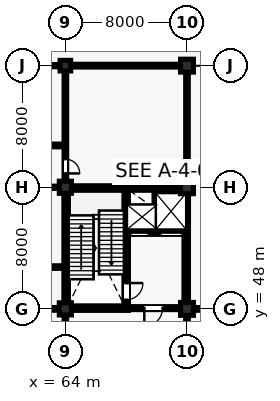
"""IFC4 building model, lengths in metres.
Left out: names, types, materials, properties, quantities, classifications, styles, units other than length and angle.
Written with IfcOpenShell. Run it as: python <this file> out.ifc"""

import sys

from ifc_helpers import new_model, si_unit, direction, frame, frame_2d, origin, origin_2d, place, context, subcontext, project, spatial, rectangle, extrude, element, fill, save


model = new_model("IFC4")
c1 = context("Model", 3, precision=1e-05, world=origin(), true_north=direction((0.0, 1.0)))
c2 = subcontext(c1, "Body", "Model", "MODEL_VIEW")
j1 = project(units=[si_unit("LENGTHUNIT", "METRE"), si_unit("PLANEANGLEUNIT", "RADIAN")], contexts=[c1])
p1 = place(None, origin())
s1 = spatial("IfcSite", under=j1, at=p1, CompositionType="ELEMENT")
p2 = place(p1, origin())
s2 = spatial("IfcBuilding", under=s1, at=p2, CompositionType="ELEMENT")
p3 = place(p2, origin())
s3 = spatial("IfcBuildingStorey", under=s2, at=p3, CompositionType="ELEMENT", Elevation=0.0)
for number, where, z_axis, x_axis in (
    (1, (64.0, 48.0, 0.0), (0.0, 0.0, 1.0), (1.0, 0.0, 0.0)),
    (2, (64.0, 56.0, 0.0), (0.0, 0.0, 1.0), (1.0, 0.0, 0.0)),
):
    element("IfcColumn", number, at=place(p3, frame(where, z_axis=z_axis, x_axis=x_axis)), inside=s3, PredefinedType="COLUMN", context=c2, shape_type="SweptSolid", body=[
        extrude(rectangle(XDim=0.8, YDim=0.8, at=origin_2d()), origin(), (0.0, 0.0, 1.0), 5.28),
    ])
p4 = place(p3, frame((64.0, 64.0, 0.0), z_axis=(0.0, 0.0, 1.0), x_axis=(1.0, 0.0, 0.0)))
e3 = element("IfcColumn", 3, at=p4, inside=s3, PredefinedType="COLUMN", context=c2, shape_type="SweptSolid", body=[
    extrude(rectangle(XDim=0.7, YDim=0.7, at=origin_2d()), origin(), (0.0, 0.0, 1.0), 5.28),
])
for number, where, z_axis, x_axis in (
    (4, (72.0, 48.0, 0.0), (0.0, 0.0, 1.0), (1.0, 0.0, 0.0)),
    (5, (72.0, 56.0, 0.0), (0.0, 0.0, 1.0), (1.0, 0.0, 0.0)),
    (6, (72.0, 64.0, 0.0), (0.0, 0.0, 1.0), (1.0, 0.0, 0.0)),
):
    element("IfcColumn", number, at=place(p3, frame(where, z_axis=z_axis, x_axis=x_axis)), inside=s3, PredefinedType="COLUMN", context=c2, shape_type="SweptSolid", body=[
        extrude(rectangle(XDim=0.85, YDim=0.85, at=origin_2d()), origin(), (0.0, 0.0, 1.0), 5.28),
    ])
p5 = place(p3, frame((64.05, 48.29, 0.0), z_axis=(0.0, 0.0, 1.0), x_axis=(0.0, 1.0, 0.0)))
e7 = element("IfcWall", 7, at=p5, inside=s3, PredefinedType="SHEAR", context=c2, shape_type="SweptSolid", body=[
    extrude(rectangle(XDim=7.42, YDim=0.3, at=frame_2d((3.71, 0.0))), origin(), (0.0, 0.0, 1.0), 5.035),
])
p6 = place(p3, frame((64.29, 55.95, 0.0), z_axis=(0.0, 0.0, 1.0), x_axis=(1.0, 0.0, 0.0)))
e8 = element("IfcWall", 8, at=p6, inside=s3, PredefinedType="SHEAR", context=c2, shape_type="SweptSolid", body=[
    extrude(rectangle(XDim=7.395, YDim=0.3, at=frame_2d((3.698, 0.0))), origin(), (0.0, 0.0, 1.0), 5.035),
])
p7 = place(p3, frame((71.95, 48.315, 0.0), z_axis=(0.0, 0.0, 1.0), x_axis=(0.0, 1.0, 0.0)))
e9 = element("IfcWall", 9, at=p7, inside=s3, PredefinedType="SHEAR", context=c2, shape_type="SweptSolid", body=[
    extrude(rectangle(XDim=7.37, YDim=0.3, at=frame_2d((3.685, 0.0))), origin(), (0.0, 0.0, 1.0), 5.035),
])
p8 = place(p3, frame((64.29, 48.05, 0.0), z_axis=(0.0, 0.0, 1.0), x_axis=(1.0, 0.0, 0.0)))
e10 = element("IfcWall", 10, at=p8, inside=s3, PredefinedType="SHEAR", context=c2, shape_type="SweptSolid", body=[
    extrude(rectangle(XDim=3.86, YDim=0.3, at=frame_2d((1.93, 0.0))), origin(), (0.0, 0.0, 1.0), 5.035),
])
p9 = place(p3, frame((68.0, 48.05, 0.0), z_axis=(0.0, 0.0, 1.0), x_axis=(0.0, 1.0, 0.0)))
e11 = element("IfcWall", 11, at=p9, inside=s3, PredefinedType="SHEAR", context=c2, shape_type="SweptSolid", body=[
    extrude(rectangle(XDim=7.9, YDim=0.3, at=frame_2d((3.95, 0.0))), origin(), (0.0, 0.0, 1.0), 5.035),
])
p10 = place(p9, frame((0.55, 0.0, 0.0)))
e12 = element("IfcOpeningElement", 12, at=p10, cuts=e11, PredefinedType="OPENING", context=c2, shape_type="SweptSolid", body=[
    extrude(rectangle(XDim=1.1, YDim=2.15, at=frame_2d((0.55, 1.075))), frame((0.0, 0.16, 0.0), z_axis=(0.0, -1.0, 0.0), x_axis=(1.0, 0.0, 0.0)), (0.0, 0.0, 1.0), 0.32),
])
p11 = place(p3, frame((68.0, 53.05, 0.0), z_axis=(0.0, 0.0, 1.0), x_axis=(1.0, 0.0, 0.0)))
e13 = element("IfcWall", 13, at=p11, inside=s3, PredefinedType="SHEAR", context=c2, shape_type="SweptSolid", body=[
    extrude(rectangle(XDim=3.95, YDim=0.3, at=frame_2d((1.975, 0.0))), origin(), (0.0, 0.0, 1.0), 5.035),
])
p12 = place(p11, frame((0.32, 0.0, 0.0)))
e14 = element("IfcOpeningElement", 14, at=p12, cuts=e13, PredefinedType="OPENING", context=c2, shape_type="SweptSolid", body=[
    extrude(rectangle(XDim=1.1, YDim=2.2, at=frame_2d((0.55, 1.1))), frame((0.0, 0.16, 0.0), z_axis=(0.0, -1.0, 0.0), x_axis=(1.0, 0.0, 0.0)), (0.0, 0.0, 1.0), 0.32),
])
p13 = place(p11, frame((2.28, 0.0, 0.0)))
e15 = element("IfcOpeningElement", 15, at=p13, cuts=e13, PredefinedType="OPENING", context=c2, shape_type="SweptSolid", body=[
    extrude(rectangle(XDim=1.35, YDim=2.3, at=frame_2d((0.675, 1.15))), frame((0.0, 0.16, 0.0), z_axis=(0.0, -1.0, 0.0), x_axis=(1.0, 0.0, 0.0)), (0.0, 0.0, 1.0), 0.32),
])
p14 = place(p3, frame((69.98, 53.05, 0.0), z_axis=(0.0, 0.0, 1.0), x_axis=(0.0, 1.0, 0.0)))
e16 = element("IfcWall", 16, at=p14, inside=s3, PredefinedType="SHEAR", context=c2, shape_type="SweptSolid", body=[
    extrude(rectangle(XDim=2.9, YDim=0.3, at=frame_2d((1.45, 0.0))), origin(), (0.0, 0.0, 1.0), 5.035),
])
p15 = place(p3, frame((68.0, 48.05, 0.0), z_axis=(0.0, 0.0, 1.0), x_axis=(1.0, 0.0, 0.0)))
e17 = element("IfcWall", 17, at=p15, inside=s3, PredefinedType="PARTITIONING", context=c2, shape_type="SweptSolid", body=[
    extrude(rectangle(XDim=3.585, YDim=0.2, at=frame_2d((1.792, 0.0))), origin(), (0.0, 0.0, 1.0), 4.336),
])
p16 = place(p15, frame((1.192, 0.0, 0.0)))
e18 = element("IfcOpeningElement", 18, at=p16, cuts=e17, PredefinedType="OPENING", context=c2, shape_type="SweptSolid", body=[
    extrude(rectangle(XDim=1.2, YDim=2.15, at=frame_2d((0.6, 1.075))), frame((0.0, 0.11, 0.0), z_axis=(0.0, -1.0, 0.0), x_axis=(1.0, 0.0, 0.0)), (0.0, 0.0, 1.0), 0.22),
])
p17 = place(p3, frame((58.7, 50.75, 0.0), z_axis=(0.0, 0.0, 1.0), x_axis=(1.0, 0.0, 0.0)))
e19 = element("IfcWall", 19, at=p17, inside=s3, PredefinedType="PARTITIONING", context=c2, shape_type="SweptSolid", body=[
    extrude(rectangle(XDim=5.28, YDim=0.175, at=frame_2d((2.64, 0.0))), origin(), (0.0, 0.0, 1.0), 4.404),
])
p18 = place(p17, frame((2.015, 0.0, 0.0)))
e20 = element("IfcOpeningElement", 20, at=p18, cuts=e19, PredefinedType="OPENING", context=c2, shape_type="SweptSolid", body=[
    extrude(rectangle(XDim=1.25, YDim=2.18, at=frame_2d((0.625, 1.09))), frame((0.0, 0.097, 0.0), z_axis=(0.0, -1.0, 0.0), x_axis=(1.0, 0.0, 0.0)), (0.0, 0.0, 1.0), 0.195),
])
p19 = place(p3, frame((58.75, 56.0, 0.0), z_axis=(0.0, 0.0, 1.0), x_axis=(1.0, 0.0, 0.0)))
e21 = element("IfcWall", 21, at=p19, inside=s3, PredefinedType="PARTITIONING", context=c2, shape_type="SweptSolid", body=[
    extrude(rectangle(XDim=4.84, YDim=0.15, at=frame_2d((2.42, 0.0))), origin(), (0.0, 0.0, 1.0), 4.336),
])
p20 = place(p3, frame((58.7, 58.75, 0.0), z_axis=(0.0, 0.0, 1.0), x_axis=(1.0, 0.0, 0.0)))
e22 = element("IfcWall", 22, at=p20, inside=s3, PredefinedType="PARTITIONING", context=c2, shape_type="SweptSolid", body=[
    extrude(rectangle(XDim=5.28, YDim=0.185, at=frame_2d((2.64, 0.0))), origin(), (0.0, 0.0, 1.0), 4.471),
])
p21 = place(p20, frame((2.17, 0.0, 0.0)))
e23 = element("IfcOpeningElement", 23, at=p21, cuts=e22, PredefinedType="OPENING", context=c2, shape_type="SweptSolid", body=[
    extrude(rectangle(XDim=0.94, YDim=2.12, at=frame_2d((0.47, 1.06))), frame((0.0, 0.103, 0.0), z_axis=(0.0, -1.0, 0.0), x_axis=(1.0, 0.0, 0.0)), (0.0, 0.0, 1.0), 0.205),
])
p22 = place(p3, frame((58.75, 64.0, 0.0), z_axis=(0.0, 0.0, 1.0), x_axis=(1.0, 0.0, 0.0)))
e24 = element("IfcWall", 24, at=p22, inside=s3, PredefinedType="PARTITIONING", context=c2, shape_type="SweptSolid", body=[
    extrude(rectangle(XDim=4.89, YDim=0.15, at=frame_2d((2.445, 0.0))), origin(), (0.0, 0.0, 1.0), 4.404),
])
p23 = place(p3, frame((64.0, 40.34, 0.0), z_axis=(0.0, 0.0, 1.0), x_axis=(0.0, 1.0, 0.0)))
e25 = element("IfcWall", 25, at=p23, inside=s3, PredefinedType="PARTITIONING", context=c2, shape_type="SweptSolid", body=[
    extrude(rectangle(XDim=7.27, YDim=0.175, at=frame_2d((3.635, 0.0))), origin(), (0.0, 0.0, 1.0), 4.412),
])
p24 = place(p23, frame((2.685, 0.0, 0.0)))
e26 = element("IfcOpeningElement", 26, at=p24, cuts=e25, PredefinedType="OPENING", context=c2, shape_type="SweptSolid", body=[
    extrude(rectangle(XDim=1.9, YDim=2.38, at=frame_2d((0.95, 1.19))), frame((0.0, 0.097, 0.0), z_axis=(0.0, -1.0, 0.0), x_axis=(1.0, 0.0, 0.0)), (0.0, 0.0, 1.0), 0.195),
])
p25 = place(p3, frame((56.34, 48.0, 0.0), z_axis=(0.0, 0.0, 1.0), x_axis=(1.0, 0.0, 0.0)))
e27 = element("IfcWall", 27, at=p25, inside=s3, PredefinedType="PARTITIONING", context=c2, shape_type="SweptSolid", body=[
    extrude(rectangle(XDim=7.27, YDim=0.185, at=frame_2d((3.635, 0.0))), origin(), (0.0, 0.0, 1.0), 4.403),
])
p26 = place(p25, frame((2.985, 0.0, 0.0)))
e28 = element("IfcOpeningElement", 28, at=p26, cuts=e27, PredefinedType="OPENING", context=c2, shape_type="SweptSolid", body=[
    extrude(rectangle(XDim=1.3, YDim=2.2, at=frame_2d((0.65, 1.1))), frame((0.0, 0.103, 0.0), z_axis=(0.0, -1.0, 0.0), x_axis=(1.0, 0.0, 0.0)), (0.0, 0.0, 1.0), 0.205),
])
p27 = place(p3, frame((64.0, 56.39, 0.0), z_axis=(0.0, 0.0, 1.0), x_axis=(0.0, 1.0, 0.0)))
e29 = element("IfcWall", 29, at=p27, inside=s3, PredefinedType="PARTITIONING", context=c2, shape_type="SweptSolid", body=[
    extrude(rectangle(XDim=7.27, YDim=0.175, at=frame_2d((3.635, 0.0))), origin(), (0.0, 0.0, 1.0), 4.471),
])
p28 = place(p27, frame((0.52, 0.0, 0.0)))
e30 = element("IfcOpeningElement", 30, at=p28, cuts=e29, PredefinedType="OPENING", context=c2, shape_type="SweptSolid", body=[
    extrude(rectangle(XDim=0.94, YDim=2.12, at=frame_2d((0.47, 1.06))), frame((0.0, 0.097, 0.0), z_axis=(0.0, -1.0, 0.0), x_axis=(1.0, 0.0, 0.0)), (0.0, 0.0, 1.0), 0.195),
])
p29 = place(p3, frame((72.0, 40.415, 0.0), z_axis=(0.0, 0.0, 1.0), x_axis=(0.0, 1.0, 0.0)))
e31 = element("IfcWall", 31, at=p29, inside=s3, PredefinedType="PARTITIONING", context=c2, shape_type="SweptSolid", body=[
    extrude(rectangle(XDim=7.17, YDim=0.185, at=frame_2d((3.585, 0.0))), origin(), (0.0, 0.0, 1.0), 4.404),
])
p30 = place(p29, frame((2.935, 0.0, 0.0)))
e32 = element("IfcOpeningElement", 32, at=p30, cuts=e31, PredefinedType="OPENING", context=c2, shape_type="SweptSolid", body=[
    extrude(rectangle(XDim=1.3, YDim=2.2, at=frame_2d((0.65, 1.1))), frame((0.0, 0.103, 0.0), z_axis=(0.0, -1.0, 0.0), x_axis=(1.0, 0.0, 0.0)), (0.0, 0.0, 1.0), 0.205),
])
p31 = place(p3, frame((72.0, 56.415, 0.0), z_axis=(0.0, 0.0, 1.0), x_axis=(0.0, 1.0, 0.0)))
e33 = element("IfcWall", 33, at=p31, inside=s3, PredefinedType="PARTITIONING", context=c2, shape_type="SweptSolid", body=[
    extrude(rectangle(XDim=7.17, YDim=0.175, at=frame_2d((3.585, 0.0))), origin(), (0.0, 0.0, 1.0), 4.403),
])
p32 = place(p3, frame((64.34, 64.0, 0.0), z_axis=(0.0, 0.0, 1.0), x_axis=(1.0, 0.0, 0.0)))
e34 = element("IfcWall", 34, at=p32, inside=s3, PredefinedType="PARTITIONING", context=c2, shape_type="SweptSolid", body=[
    extrude(rectangle(XDim=7.245, YDim=0.185, at=frame_2d((3.623, 0.0))), origin(), (0.0, 0.0, 1.0), 4.327),
])
p33 = place(p3, frame((72.415, 48.0, 0.0), z_axis=(0.0, 0.0, 1.0), x_axis=(1.0, 0.0, 0.0)))
e35 = element("IfcWall", 35, at=p33, inside=s3, PredefinedType="PARTITIONING", context=c2, shape_type="SweptSolid", body=[
    extrude(rectangle(XDim=7.396, YDim=0.185, at=frame_2d((3.698, 0.0))), origin(), (0.0, 0.0, 1.0), 4.404),
])
p34 = place(p33, frame((3.048, 0.0, 0.0)))
e36 = element("IfcOpeningElement", 36, at=p34, cuts=e35, PredefinedType="OPENING", context=c2, shape_type="SweptSolid", body=[
    extrude(rectangle(XDim=1.3, YDim=2.2, at=frame_2d((0.65, 1.1))), frame((0.0, 0.103, 0.0), z_axis=(0.0, -1.0, 0.0), x_axis=(1.0, 0.0, 0.0)), (0.0, 0.0, 1.0), 0.205),
])
p35 = place(p10, frame((1.1, 0.0, 0.0), z_axis=(0.0, 0.0, 1.0), x_axis=(-1.0, 0.0, 0.0)))
e37 = element("IfcDoor", 37, at=p35, inside=s3, OperationType="SINGLE_SWING_RIGHT", PredefinedType="DOOR", context=c2, shape_type="SweptSolid", body=[
    extrude(rectangle(XDim=1.1, YDim=2.15, at=frame_2d((0.55, 1.075))), frame((0.0, 0.025, 0.0), z_axis=(0.0, -1.0, 0.0), x_axis=(1.0, 0.0, 0.0)), (0.0, 0.0, 1.0), 0.05),
])
fill(e12, e37)
p36 = place(p12, origin())
e38 = element("IfcDoor", 38, at=p36, inside=s3, OperationType="SLIDING_TO_LEFT", PredefinedType="DOOR", context=c2, shape_type="SweptSolid", body=[
    extrude(rectangle(XDim=1.1, YDim=2.2, at=frame_2d((0.55, 1.1))), frame((0.0, 0.025, 0.0), z_axis=(0.0, -1.0, 0.0), x_axis=(1.0, 0.0, 0.0)), (0.0, 0.0, 1.0), 0.05),
])
fill(e14, e38)
p37 = place(p13, origin())
e39 = element("IfcDoor", 39, at=p37, inside=s3, OperationType="DOUBLE_DOOR_SLIDING", PredefinedType="DOOR", context=c2, shape_type="SweptSolid", body=[
    extrude(rectangle(XDim=1.35, YDim=2.3, at=frame_2d((0.675, 1.15))), frame((0.0, 0.025, 0.0), z_axis=(0.0, -1.0, 0.0), x_axis=(1.0, 0.0, 0.0)), (0.0, 0.0, 1.0), 0.05),
])
fill(e15, e39)
p38 = place(p16, frame((1.2, 0.0, 0.0), z_axis=(0.0, 0.0, 1.0), x_axis=(-1.0, 0.0, 0.0)))
e40 = element("IfcDoor", 40, at=p38, inside=s3, OperationType="SINGLE_SWING_LEFT", PredefinedType="DOOR", context=c2, shape_type="SweptSolid", body=[
    extrude(rectangle(XDim=1.2, YDim=2.15, at=frame_2d((0.6, 1.075))), frame((0.0, 0.025, 0.0), z_axis=(0.0, -1.0, 0.0), x_axis=(1.0, 0.0, 0.0)), (0.0, 0.0, 1.0), 0.05),
])
fill(e18, e40)
p39 = place(p28, frame((0.94, 0.0, 0.0), z_axis=(0.0, 0.0, 1.0), x_axis=(-1.0, 0.0, 0.0)))
e41 = element("IfcDoor", 41, at=p39, inside=s3, OperationType="SINGLE_SWING_LEFT", PredefinedType="DOOR", context=c2, shape_type="SweptSolid", body=[
    extrude(rectangle(XDim=0.94, YDim=2.12, at=frame_2d((0.47, 1.06))), frame((0.0, 0.025, 0.0), z_axis=(0.0, -1.0, 0.0), x_axis=(1.0, 0.0, 0.0)), (0.0, 0.0, 1.0), 0.05),
])
fill(e30, e41)
save(model, sys.argv[1])
